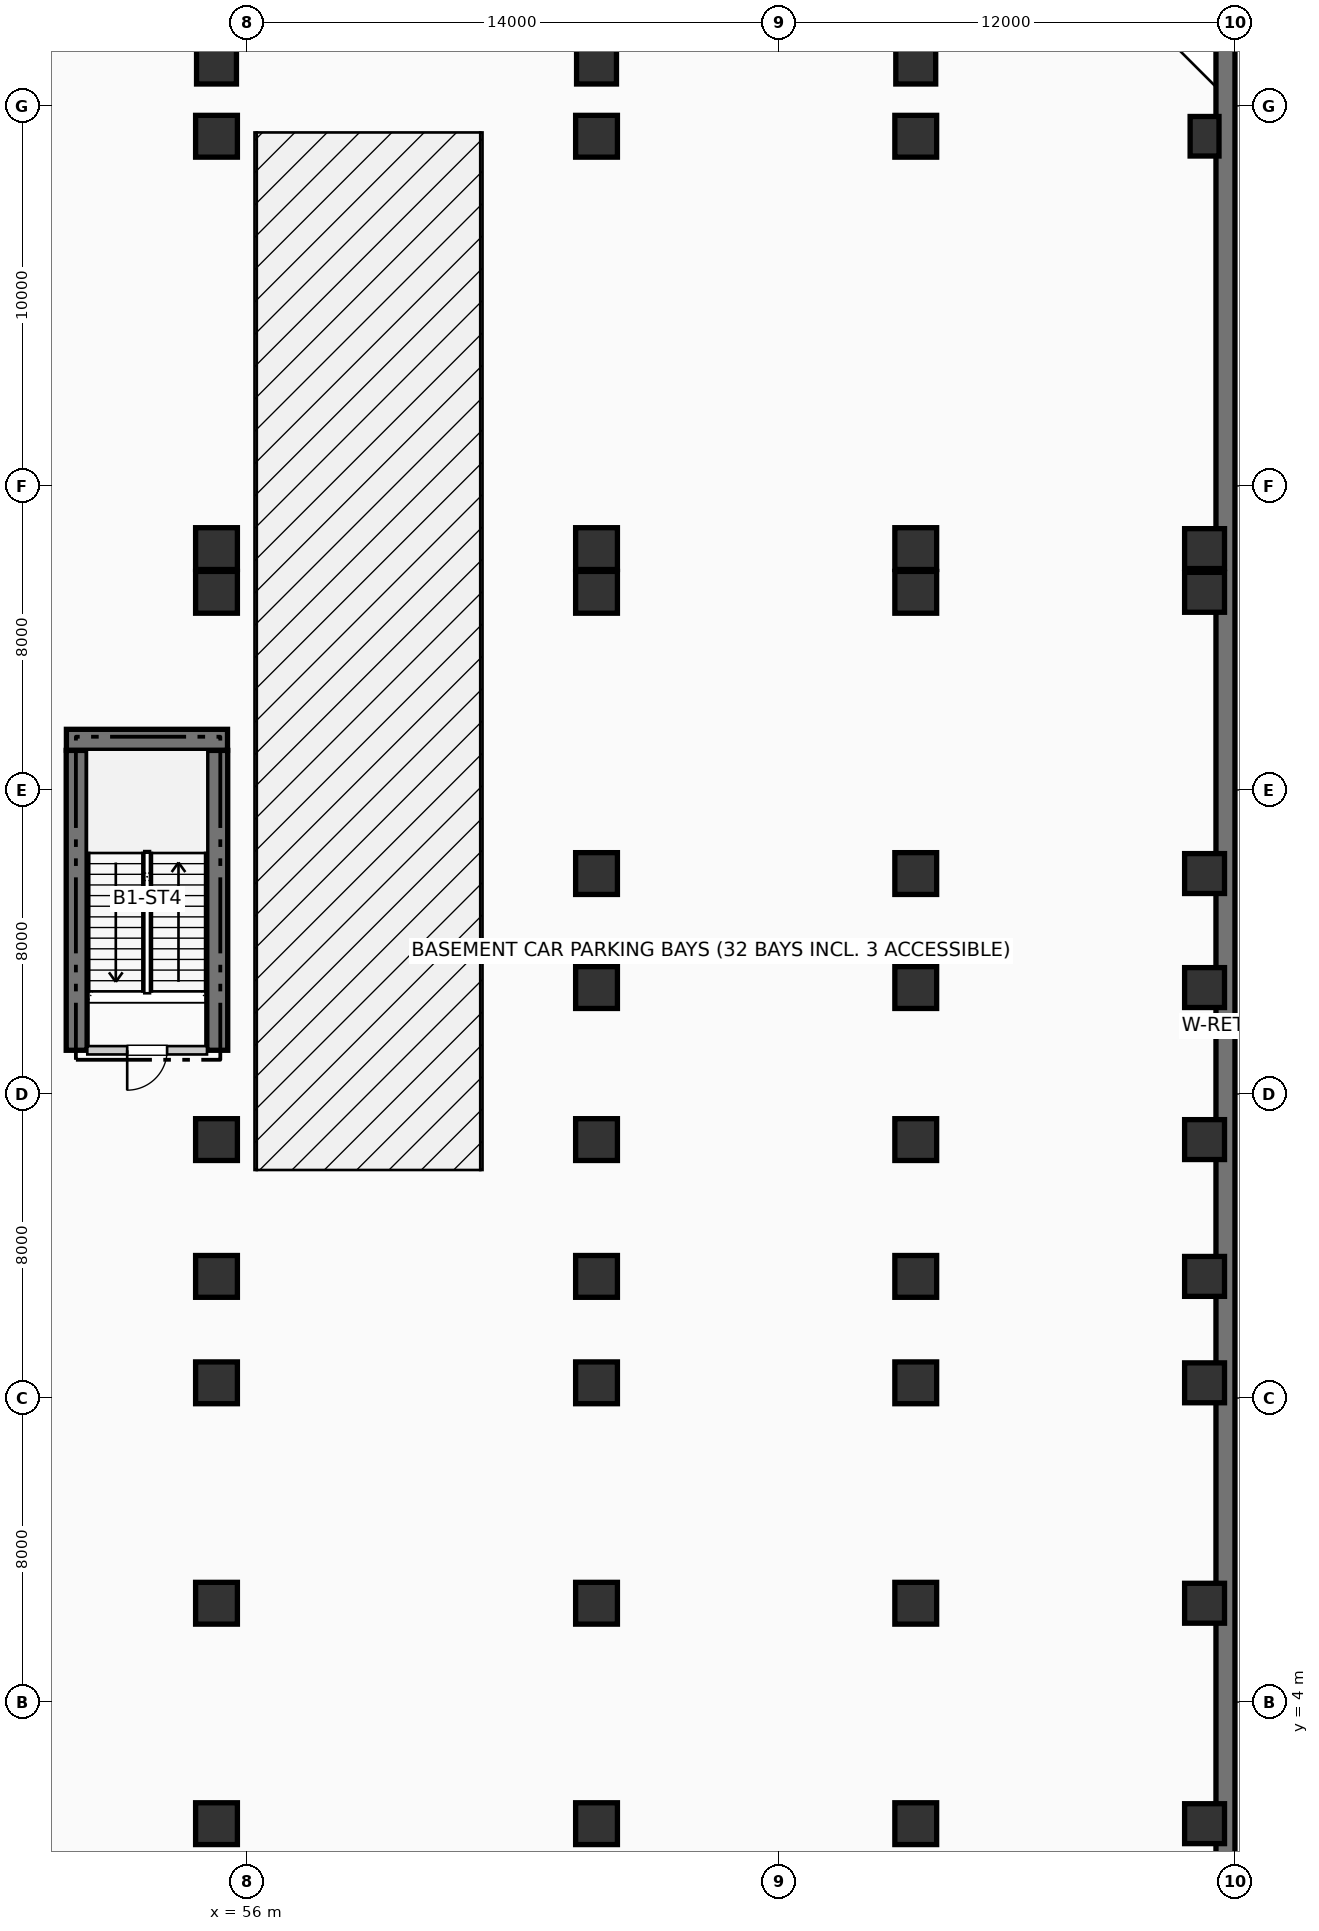
"""IFC4 building model, lengths in metres.
Left out: names, types, materials, properties, quantities, classifications, styles, units other than length and angle.
Written with IfcOpenShell. Run it as: python <this file> out.ifc"""

import sys

from ifc_helpers import new_model, si_unit, direction, frame, frame_2d, origin, origin_2d, place, context, subcontext, project, spatial, rectangle, extrude, element, fill, save


model = new_model("IFC4")
c1 = context("Model", 3, precision=1e-05, world=origin(), true_north=direction((0.0, 1.0)))
c2 = subcontext(c1, "Body", "Model", "MODEL_VIEW")
j1 = project(units=[si_unit("LENGTHUNIT", "METRE"), si_unit("PLANEANGLEUNIT", "RADIAN")], contexts=[c1])
p1 = place(None, origin())
s1 = spatial("IfcSite", under=j1, at=p1, CompositionType="ELEMENT")
p2 = place(p1, origin())
s2 = spatial("IfcBuilding", under=s1, at=p2, CompositionType="ELEMENT")
p3 = place(p2, frame((0.0, 0.0, -4.62)))
s3 = spatial("IfcBuildingStorey", under=s2, at=p3, CompositionType="ELEMENT", Elevation=-4.62)
for number, where, z_axis, x_axis in (
    (1, (51.52, 21.15, 0.0), (0.0, 0.0, 1.0), (0.0, 1.0, 0.0)),
    (2, (55.22, 21.15, 0.0), (0.0, 0.0, 1.0), (0.0, 1.0, 0.0)),
):
    element("IfcWall", number, at=place(p3, frame(where, z_axis=z_axis, x_axis=x_axis)), inside=s3, PredefinedType="SHEAR", context=c2, shape_type="SweptSolid", body=[
        extrude(rectangle(XDim=7.89, YDim=0.55, at=frame_2d((3.945, 0.0))), origin(), (0.0, 0.0, 1.0), 4.62),
    ])
p4 = place(p3, frame((51.25, 29.32, 0.0), z_axis=(0.0, 0.0, 1.0), x_axis=(1.0, 0.0, 0.0)))
e3 = element("IfcWall", 3, at=p4, inside=s3, PredefinedType="SHEAR", context=c2, shape_type="SweptSolid", body=[
    extrude(rectangle(XDim=4.24, YDim=0.55, at=frame_2d((2.12, 0.0))), origin(), (0.0, 0.0, 1.0), 4.62),
])
p5 = place(p3, frame((81.75, -2.0, 0.0), z_axis=(0.0, 0.0, 1.0), x_axis=(0.0, 1.0, 0.0)))
e4 = element("IfcWall", 4, at=p5, inside=s3, PredefinedType="SOLIDWALL", context=c2, shape_type="SweptSolid", body=[
    extrude(rectangle(XDim=50.0, YDim=0.5, at=frame_2d((25.0, 0.0))), origin(), (0.0, 0.0, 1.0), 4.62),
])
for number, where, z_axis, x_axis in (
    (5, (55.2, 0.8, 0.0), (0.0, 0.0, 1.0), (1.0, 0.0, 0.0)),
    (6, (55.2, 6.6, 0.0), (0.0, 0.0, 1.0), (1.0, 0.0, 0.0)),
    (7, (55.2, 12.4, 0.0), (0.0, 0.0, 1.0), (1.0, 0.0, 0.0)),
    (8, (55.2, 15.2, 0.0), (0.0, 0.0, 1.0), (1.0, 0.0, 0.0)),
    (9, (55.2, 18.8, 0.0), (0.0, 0.0, 1.0), (1.0, 0.0, 0.0)),
    (10, (55.2, 33.2, 0.0), (0.0, 0.0, 1.0), (1.0, 0.0, 0.0)),
    (11, (55.2, 34.35, 0.0), (0.0, 0.0, 1.0), (1.0, 0.0, 0.0)),
    (12, (55.2, 45.2, 0.0), (0.0, 0.0, 1.0), (1.0, 0.0, 0.0)),
):
    element("IfcColumn", number, at=place(p3, frame(where, z_axis=z_axis, x_axis=x_axis)), inside=s3, PredefinedType="COLUMN", context=c2, shape_type="SweptSolid", body=[
        extrude(rectangle(XDim=1.1, YDim=1.1, at=origin_2d()), origin(), (0.0, 0.0, 1.0), 4.62),
    ])
p6 = place(p3, frame((55.2, 47.1, 0.0), z_axis=(0.0, 0.0, 1.0), x_axis=(1.0, 0.0, 0.0)))
e13 = element("IfcColumn", 13, at=p6, inside=s3, PredefinedType="COLUMN", context=c2, shape_type="SweptSolid", body=[
    extrude(rectangle(XDim=1.05, YDim=1.05, at=origin_2d()), origin(), (0.0, 0.0, 1.0), 4.62),
])
for number, where, z_axis, x_axis in (
    (14, (65.2, 0.8, 0.0), (0.0, 0.0, 1.0), (1.0, 0.0, 0.0)),
    (15, (65.2, 6.6, 0.0), (0.0, 0.0, 1.0), (1.0, 0.0, 0.0)),
    (16, (65.2, 12.4, 0.0), (0.0, 0.0, 1.0), (1.0, 0.0, 0.0)),
    (17, (65.2, 15.2, 0.0), (0.0, 0.0, 1.0), (1.0, 0.0, 0.0)),
    (18, (65.2, 18.8, 0.0), (0.0, 0.0, 1.0), (1.0, 0.0, 0.0)),
    (19, (65.2, 22.8, 0.0), (0.0, 0.0, 1.0), (1.0, 0.0, 0.0)),
    (20, (65.2, 25.8, 0.0), (0.0, 0.0, 1.0), (1.0, 0.0, 0.0)),
    (21, (65.2, 33.2, 0.0), (0.0, 0.0, 1.0), (1.0, 0.0, 0.0)),
    (22, (65.2, 34.35, 0.0), (0.0, 0.0, 1.0), (1.0, 0.0, 0.0)),
    (23, (65.2, 45.2, 0.0), (0.0, 0.0, 1.0), (1.0, 0.0, 0.0)),
):
    element("IfcColumn", number, at=place(p3, frame(where, z_axis=z_axis, x_axis=x_axis)), inside=s3, PredefinedType="COLUMN", context=c2, shape_type="SweptSolid", body=[
        extrude(rectangle(XDim=1.1, YDim=1.1, at=origin_2d()), origin(), (0.0, 0.0, 1.0), 4.62),
    ])
p7 = place(p3, frame((65.2, 47.1, 0.0), z_axis=(0.0, 0.0, 1.0), x_axis=(1.0, 0.0, 0.0)))
e24 = element("IfcColumn", 24, at=p7, inside=s3, PredefinedType="COLUMN", context=c2, shape_type="SweptSolid", body=[
    extrude(rectangle(XDim=1.05, YDim=1.05, at=origin_2d()), origin(), (0.0, 0.0, 1.0), 4.62),
])
for number, where, z_axis, x_axis in (
    (25, (73.6, 0.8, 0.0), (0.0, 0.0, 1.0), (1.0, 0.0, 0.0)),
    (26, (73.6, 6.6, 0.0), (0.0, 0.0, 1.0), (1.0, 0.0, 0.0)),
    (27, (73.6, 12.4, 0.0), (0.0, 0.0, 1.0), (1.0, 0.0, 0.0)),
    (28, (73.6, 15.2, 0.0), (0.0, 0.0, 1.0), (1.0, 0.0, 0.0)),
    (29, (73.6, 18.8, 0.0), (0.0, 0.0, 1.0), (1.0, 0.0, 0.0)),
    (30, (73.6, 22.8, 0.0), (0.0, 0.0, 1.0), (1.0, 0.0, 0.0)),
    (31, (73.6, 25.8, 0.0), (0.0, 0.0, 1.0), (1.0, 0.0, 0.0)),
    (32, (73.6, 33.2, 0.0), (0.0, 0.0, 1.0), (1.0, 0.0, 0.0)),
    (33, (73.6, 34.35, 0.0), (0.0, 0.0, 1.0), (1.0, 0.0, 0.0)),
    (34, (73.6, 45.2, 0.0), (0.0, 0.0, 1.0), (1.0, 0.0, 0.0)),
):
    element("IfcColumn", number, at=place(p3, frame(where, z_axis=z_axis, x_axis=x_axis)), inside=s3, PredefinedType="COLUMN", context=c2, shape_type="SweptSolid", body=[
        extrude(rectangle(XDim=1.1, YDim=1.1, at=origin_2d()), origin(), (0.0, 0.0, 1.0), 4.62),
    ])
for number, where, z_axis, x_axis in (
    (35, (73.6, 47.1, 0.0), (0.0, 0.0, 1.0), (1.0, 0.0, 0.0)),
    (36, (81.2, 0.8, 0.0), (0.0, 0.0, 1.0), (1.0, 0.0, 0.0)),
    (37, (81.2, 6.6, 0.0), (0.0, 0.0, 1.0), (1.0, 0.0, 0.0)),
    (38, (81.2, 12.4, 0.0), (0.0, 0.0, 1.0), (1.0, 0.0, 0.0)),
    (39, (81.2, 15.2, 0.0), (0.0, 0.0, 1.0), (1.0, 0.0, 0.0)),
    (40, (81.2, 18.8, 0.0), (0.0, 0.0, 1.0), (1.0, 0.0, 0.0)),
    (41, (81.2, 22.8, 0.0), (0.0, 0.0, 1.0), (1.0, 0.0, 0.0)),
    (42, (81.2, 25.8, 0.0), (0.0, 0.0, 1.0), (1.0, 0.0, 0.0)),
    (43, (81.2, 33.2, 0.0), (0.0, 0.0, 1.0), (1.0, 0.0, 0.0)),
    (44, (81.2, 34.35, 0.0), (0.0, 0.0, 1.0), (1.0, 0.0, 0.0)),
):
    element("IfcColumn", number, at=place(p3, frame(where, z_axis=z_axis, x_axis=x_axis)), inside=s3, PredefinedType="COLUMN", context=c2, shape_type="SweptSolid", body=[
        extrude(rectangle(XDim=1.05, YDim=1.05, at=origin_2d()), origin(), (0.0, 0.0, 1.0), 4.62),
    ])
p8 = place(p3, frame((81.2, 45.2, 0.0), z_axis=(0.0, 0.0, 1.0), x_axis=(1.0, 0.0, 0.0)))
e45 = element("IfcColumn", 45, at=p8, inside=s3, PredefinedType="PILASTER", context=c2, shape_type="SweptSolid", body=[
    extrude(rectangle(XDim=0.76, YDim=1.04, at=origin_2d()), origin(), (0.0, 0.0, 1.0), 4.62),
])
p9 = place(p3, frame((51.8, 21.15, 0.0), z_axis=(0.0, 0.0, 1.0), x_axis=(1.0, 0.0, 0.0)))
e46 = element("IfcWall", 46, at=p9, inside=s3, PredefinedType="PARTITIONING", context=c2, shape_type="SweptSolid", body=[
    extrude(rectangle(XDim=3.15, YDim=0.22, at=frame_2d((1.575, 0.0))), origin(), (0.0, 0.0, 1.0), 4.3),
])
p10 = place(p9, frame((2.1, 0.0, 0.0), z_axis=(0.0, 0.0, 1.0), x_axis=(-1.0, 0.0, 0.0)))
e47 = element("IfcOpeningElement", 47, at=p10, cuts=e46, PredefinedType="OPENING", context=c2, shape_type="SweptSolid", body=[
    extrude(rectangle(XDim=1.05, YDim=2.15, at=frame_2d((0.525, 1.075))), frame((0.0, 0.12, 0.0), z_axis=(0.0, -1.0, 0.0), x_axis=(1.0, 0.0, 0.0)), (0.0, 0.0, 1.0), 0.24),
])
p11 = place(p10, origin())
e48 = element("IfcDoor", 48, at=p11, inside=s3, OperationType="SINGLE_SWING_LEFT", PredefinedType="DOOR", context=c2, shape_type="SweptSolid", body=[
    extrude(rectangle(XDim=1.05, YDim=2.15, at=frame_2d((0.525, 1.075))), frame((0.0, 0.025, 0.0), z_axis=(0.0, -1.0, 0.0), x_axis=(1.0, 0.0, 0.0)), (0.0, 0.0, 1.0), 0.05),
])
fill(e47, e48)
save(model, sys.argv[1])
